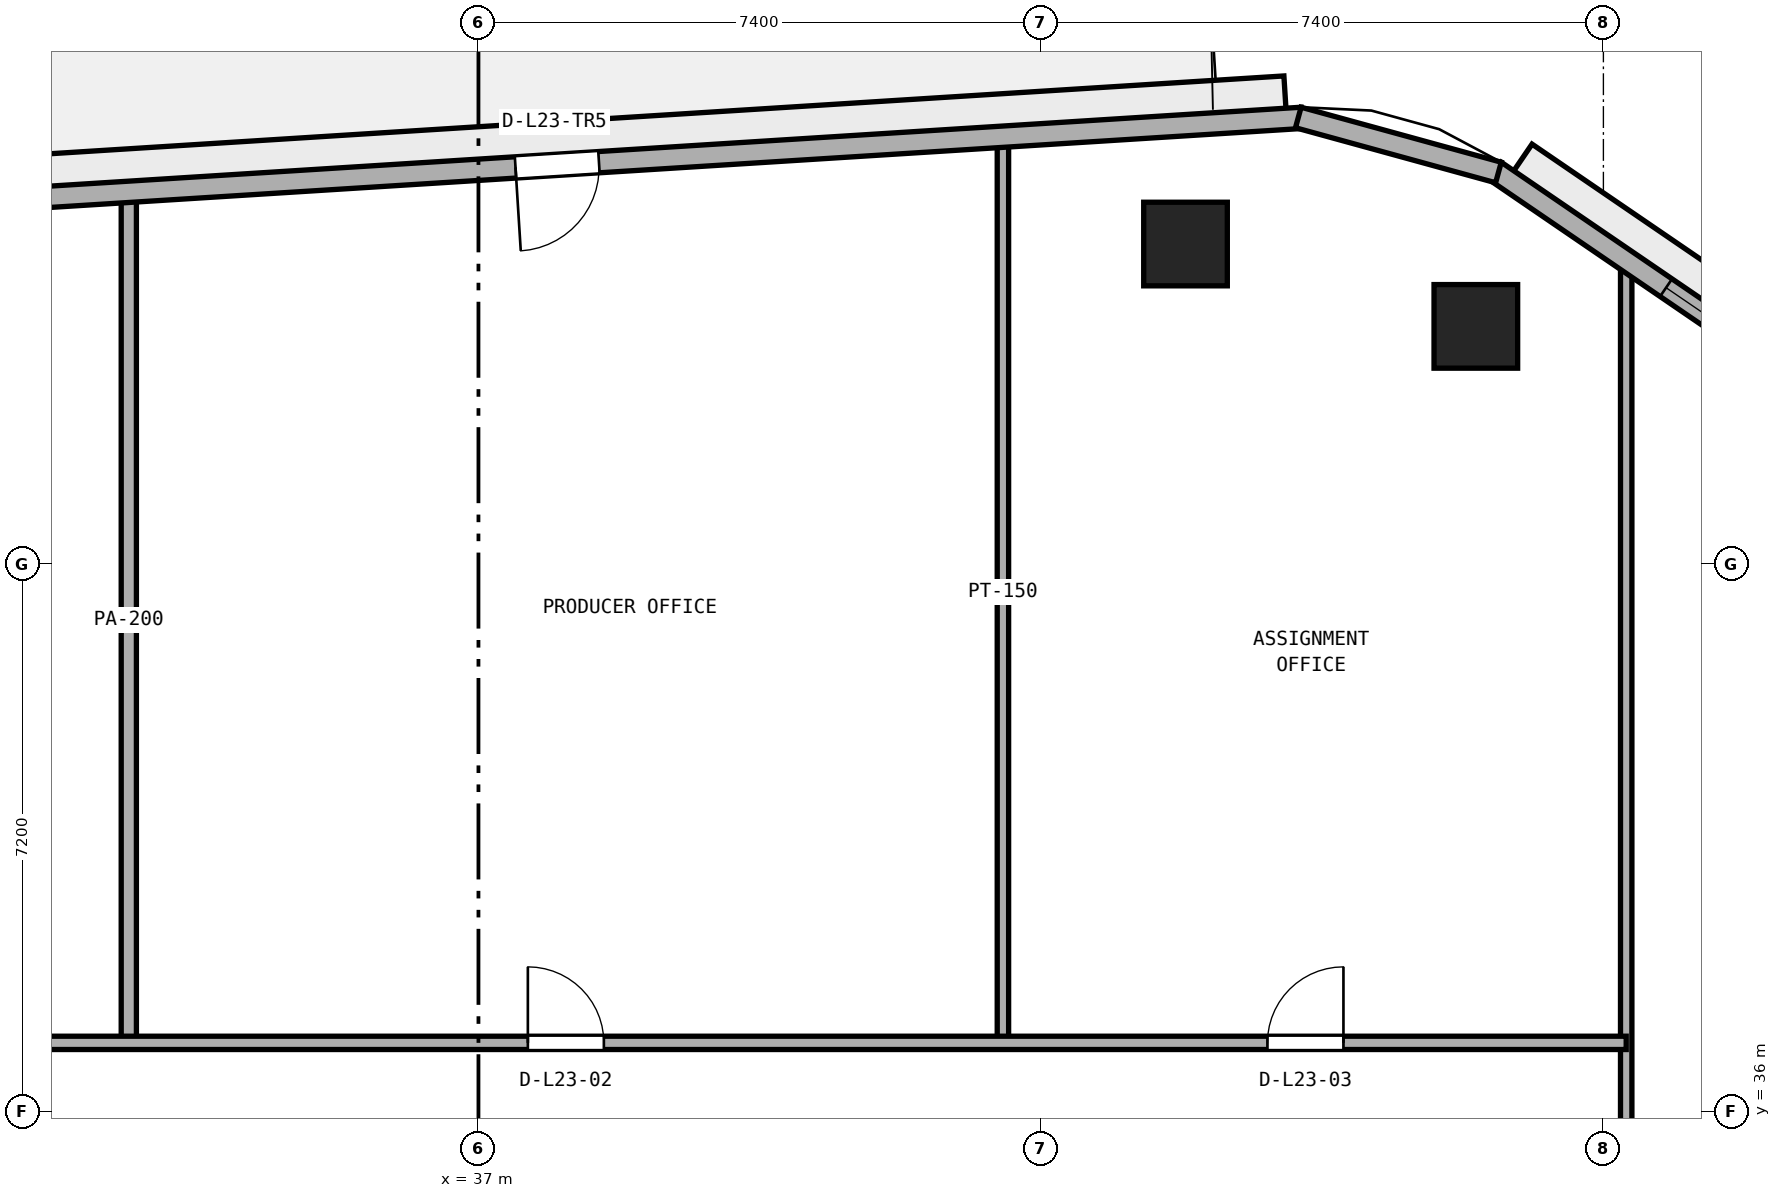
"""IFC4 building model, lengths in metres.
Left out: names, types, materials, properties, quantities, classifications, styles, units other than length and angle.
Written with IfcOpenShell. Run it as: python <this file> out.ifc"""

import sys

from ifc_helpers import new_model, si_unit, direction, frame, frame_2d, origin, origin_2d, place, context, subcontext, project, spatial, rectangle, extrude, element, fill, save


model = new_model("IFC4")
c1 = context("Model", 3, precision=1e-05, world=origin(), true_north=direction((0.0, 1.0)))
c2 = subcontext(c1, "Body", "Model", "MODEL_VIEW")
j1 = project(units=[si_unit("LENGTHUNIT", "METRE"), si_unit("PLANEANGLEUNIT", "RADIAN")], contexts=[c1])
p1 = place(None, origin())
s1 = spatial("IfcSite", under=j1, at=p1, CompositionType="ELEMENT")
p2 = place(p1, origin())
s2 = spatial("IfcBuilding", under=s1, at=p2, CompositionType="ELEMENT")
p3 = place(p2, frame((0.0, 0.0, 93.4)))
s3 = spatial("IfcBuildingStorey", under=s2, at=p3, CompositionType="ELEMENT", Elevation=93.4)
for number, where, z_axis, x_axis in (
    (1, (50.122, 46.326, 0.0), (0.0, 0.0, 1.0), (1.0, 0.0, 0.0)),
    (2, (46.302, 47.409, 0.0), (0.0, 0.0, 1.0), (1.0, 0.0, 0.0)),
):
    element("IfcColumn", number, at=place(p3, frame(where, z_axis=z_axis, x_axis=x_axis)), inside=s3, PredefinedType="COLUMN", context=c2, shape_type="SweptSolid", body=[
        extrude(rectangle(XDim=1.1, YDim=1.1, at=origin_2d()), origin(), (0.0, 0.0, 1.0), 3.8),
    ])
p4 = place(p3, frame((52.1, 13.5, 0.0), z_axis=(0.0, 0.0, 1.0), x_axis=(0.0, 1.0, 0.0)))
e3 = element("IfcWall", 3, at=p4, inside=s3, PredefinedType="PARTITIONING", context=c2, shape_type="SweptSolid", body=[
    extrude(rectangle(XDim=33.723, YDim=0.15, at=frame_2d((16.861, 0.0))), origin(), (0.0, 0.0, 1.0), 3.525),
])
p5 = place(p4, frame((4.475, 0.0, 0.0)))
e4 = element("IfcOpeningElement", 4, at=p5, cuts=e3, PredefinedType="OPENING", context=c2, shape_type="SweptSolid", body=[
    extrude(rectangle(XDim=0.9, YDim=2.1, at=frame_2d((0.45, 1.05))), frame((0.0, 0.085, 0.0), z_axis=(0.0, -1.0, 0.0), x_axis=(1.0, 0.0, 0.0)), (0.0, 0.0, 1.0), 0.17),
])
p6 = place(p4, frame((9.85, 0.0, 0.0)))
e5 = element("IfcOpeningElement", 5, at=p6, cuts=e3, PredefinedType="OPENING", context=c2, shape_type="SweptSolid", body=[
    extrude(rectangle(XDim=0.9, YDim=2.1, at=frame_2d((0.45, 1.05))), frame((0.0, 0.085, 0.0), z_axis=(0.0, -1.0, 0.0), x_axis=(1.0, 0.0, 0.0)), (0.0, 0.0, 1.0), 0.17),
])
p7 = place(p4, frame((18.4, 0.0, 0.0)))
e6 = element("IfcOpeningElement", 6, at=p7, cuts=e3, PredefinedType="OPENING", context=c2, shape_type="SweptSolid", body=[
    extrude(rectangle(XDim=0.9, YDim=2.1, at=frame_2d((0.45, 1.05))), frame((0.0, 0.085, 0.0), z_axis=(0.0, -1.0, 0.0), x_axis=(1.0, 0.0, 0.0)), (0.0, 0.0, 1.0), 0.17),
])
p8 = place(p3, frame((43.9, 36.9, 0.0), z_axis=(0.0, 0.0, 1.0), x_axis=(0.0, 1.0, 0.0)))
e7 = element("IfcWall", 7, at=p8, inside=s3, PredefinedType="PARTITIONING", context=c2, shape_type="SweptSolid", body=[
    extrude(rectangle(XDim=11.857, YDim=0.15, at=frame_2d((5.928, 0.0))), origin(), (0.0, 0.0, 1.0), 3.525),
])
p9 = place(p3, frame((32.4, 36.901, 0.0), z_axis=(0.0, 0.0, 1.0), x_axis=(0.0, 1.0, 0.0)))
e8 = element("IfcWall", 8, at=p9, inside=s3, PredefinedType="PARTITIONING", context=c2, shape_type="SweptSolid", body=[
    extrude(rectangle(XDim=11.131, YDim=0.2, at=frame_2d((5.565, 0.0))), origin(), (0.0, 0.0, 1.0), 3.525),
])
p10 = place(p3, frame((21.9, 36.9, 0.0), z_axis=(0.0, 0.0, 1.0), x_axis=(1.0, 0.0, 0.0)))
e9 = element("IfcWall", 9, at=p10, inside=s3, PredefinedType="PARTITIONING", context=c2, shape_type="SweptSolid", body=[
    extrude(rectangle(XDim=30.2, YDim=0.175, at=frame_2d((15.1, 0.0))), origin(), (0.0, 0.0, 1.0), 3.525),
])
p11 = place(p10, frame((4.87, 0.0, 0.0)))
e10 = element("IfcOpeningElement", 10, at=p11, cuts=e9, PredefinedType="OPENING", context=c2, shape_type="SweptSolid", body=[
    extrude(rectangle(XDim=1.0, YDim=2.12, at=frame_2d((0.5, 1.06))), frame((0.0, 0.097, 0.0), z_axis=(0.0, -1.0, 0.0), x_axis=(1.0, 0.0, 0.0)), (0.0, 0.0, 1.0), 0.195),
])
p12 = place(p10, frame((15.75, 0.0, 0.0)))
e11 = element("IfcOpeningElement", 11, at=p12, cuts=e9, PredefinedType="OPENING", context=c2, shape_type="SweptSolid", body=[
    extrude(rectangle(XDim=1.0, YDim=2.12, at=frame_2d((0.5, 1.06))), frame((0.0, 0.097, 0.0), z_axis=(0.0, -1.0, 0.0), x_axis=(1.0, 0.0, 0.0)), (0.0, 0.0, 1.0), 0.195),
])
p13 = place(p10, frame((25.48, 0.0, 0.0)))
e12 = element("IfcOpeningElement", 12, at=p13, cuts=e9, PredefinedType="OPENING", context=c2, shape_type="SweptSolid", body=[
    extrude(rectangle(XDim=1.0, YDim=2.12, at=frame_2d((0.5, 1.06))), frame((0.0, 0.097, 0.0), z_axis=(0.0, -1.0, 0.0), x_axis=(1.0, 0.0, 0.0)), (0.0, 0.0, 1.0), 0.195),
])
p14 = place(p3, frame((64.29, 38.867, 0.0), z_axis=(0.0, 0.0, 1.0), x_axis=(-0.825755550159, 0.564028165416, 0.0)))
e13 = element("IfcWall", 13, at=p14, inside=s3, PredefinedType="STANDARD", context=c2, shape_type="SweptSolid", body=[
    extrude(rectangle(XDim=16.848, YDim=0.28, at=frame_2d((8.424, 0.0))), origin(), (0.0, 0.0, 1.0), 3.525),
])
p15 = place(p14, frame((1.941, 0.0, 0.9)))
e14 = element("IfcOpeningElement", 14, at=p15, cuts=e13, PredefinedType="OPENING", context=c2, shape_type="SweptSolid", body=[
    extrude(rectangle(XDim=2.4, YDim=1.75, at=frame_2d((1.2, 0.875))), frame((0.0, 0.15, 0.0), z_axis=(0.0, -1.0, 0.0), x_axis=(1.0, 0.0, 0.0)), (0.0, 0.0, 1.0), 0.3),
])
p16 = place(p14, frame((7.224, 0.0, 0.9)))
e15 = element("IfcOpeningElement", 15, at=p16, cuts=e13, PredefinedType="OPENING", context=c2, shape_type="SweptSolid", body=[
    extrude(rectangle(XDim=2.4, YDim=1.75, at=frame_2d((1.2, 0.875))), frame((0.0, 0.15, 0.0), z_axis=(0.0, -1.0, 0.0), x_axis=(1.0, 0.0, 0.0)), (0.0, 0.0, 1.0), 0.3),
])
p17 = place(p14, frame((11.727, 0.0, 0.9)))
e16 = element("IfcOpeningElement", 16, at=p17, cuts=e13, PredefinedType="OPENING", context=c2, shape_type="SweptSolid", body=[
    extrude(rectangle(XDim=2.4, YDim=1.75, at=frame_2d((1.2, 0.875))), frame((0.0, 0.15, 0.0), z_axis=(0.0, -1.0, 0.0), x_axis=(1.0, 0.0, 0.0)), (0.0, 0.0, 1.0), 0.3),
])
p18 = place(p3, frame((47.832, 49.069, 0.0), z_axis=(0.0, 0.0, 1.0), x_axis=(-0.998017725054, -0.062933460723, 0.0)))
e17 = element("IfcWall", 17, at=p18, inside=s3, PredefinedType="STANDARD", context=c2, shape_type="SweptSolid", body=[
    extrude(rectangle(XDim=19.629, YDim=0.28, at=frame_2d((9.815, 0.0))), origin(), (0.0, 0.0, 1.0), 3.525),
])
p19 = place(p18, frame((9.265, 0.0, 0.0)))
e18 = element("IfcOpeningElement", 18, at=p19, cuts=e17, PredefinedType="OPENING", context=c2, shape_type="SweptSolid", body=[
    extrude(rectangle(XDim=1.1, YDim=2.2, at=frame_2d((0.55, 1.1))), frame((0.0, 0.15, 0.0), z_axis=(0.0, -1.0, 0.0), x_axis=(1.0, 0.0, 0.0)), (0.0, 0.0, 1.0), 0.3),
])
p20 = place(p3, frame((50.419, 48.351, 0.0), z_axis=(0.0, 0.0, 1.0), x_axis=(-0.964254516967, 0.264977784933, 0.0)))
e19 = element("IfcWall", 19, at=p20, inside=s3, PredefinedType="STANDARD", context=c2, shape_type="SweptSolid", body=[
    extrude(rectangle(XDim=2.731, YDim=0.28, at=frame_2d((1.365, 0.0))), origin(), (0.0, 0.0, 1.0), 3.525),
])
p21 = place(p12, origin())
e20 = element("IfcDoor", 20, at=p21, inside=s3, OperationType="SINGLE_SWING_LEFT", PredefinedType="DOOR", context=c2, shape_type="SweptSolid", body=[
    extrude(rectangle(XDim=1.0, YDim=2.12, at=frame_2d((0.5, 1.06))), frame((0.0, 0.025, 0.0), z_axis=(0.0, -1.0, 0.0), x_axis=(1.0, 0.0, 0.0)), (0.0, 0.0, 1.0), 0.05),
])
fill(e11, e20)
p22 = place(p13, origin())
e21 = element("IfcDoor", 21, at=p22, inside=s3, OperationType="SINGLE_SWING_RIGHT", PredefinedType="DOOR", context=c2, shape_type="SweptSolid", body=[
    extrude(rectangle(XDim=1.0, YDim=2.12, at=frame_2d((0.5, 1.06))), frame((0.0, 0.025, 0.0), z_axis=(0.0, -1.0, 0.0), x_axis=(1.0, 0.0, 0.0)), (0.0, 0.0, 1.0), 0.05),
])
fill(e12, e21)
p23 = place(p17, origin())
e22 = element("IfcWindow", 22, at=p23, inside=s3, PartitioningType="SINGLE_PANEL", PredefinedType="WINDOW", context=c2, shape_type="SweptSolid", body=[
    extrude(rectangle(XDim=2.4, YDim=1.75, at=frame_2d((1.2, 0.875))), frame((0.0, 0.03, 0.0), z_axis=(0.0, -1.0, 0.0), x_axis=(1.0, 0.0, 0.0)), (0.0, 0.0, 1.0), 0.06),
])
fill(e16, e22)
p24 = place(p19, origin())
e23 = element("IfcDoor", 23, at=p24, inside=s3, OperationType="SINGLE_SWING_RIGHT", PredefinedType="DOOR", context=c2, shape_type="SweptSolid", body=[
    extrude(rectangle(XDim=1.1, YDim=2.2, at=frame_2d((0.55, 1.1))), frame((0.0, 0.025, 0.0), z_axis=(0.0, -1.0, 0.0), x_axis=(1.0, 0.0, 0.0)), (0.0, 0.0, 1.0), 0.05),
])
fill(e18, e23)
save(model, sys.argv[1])
